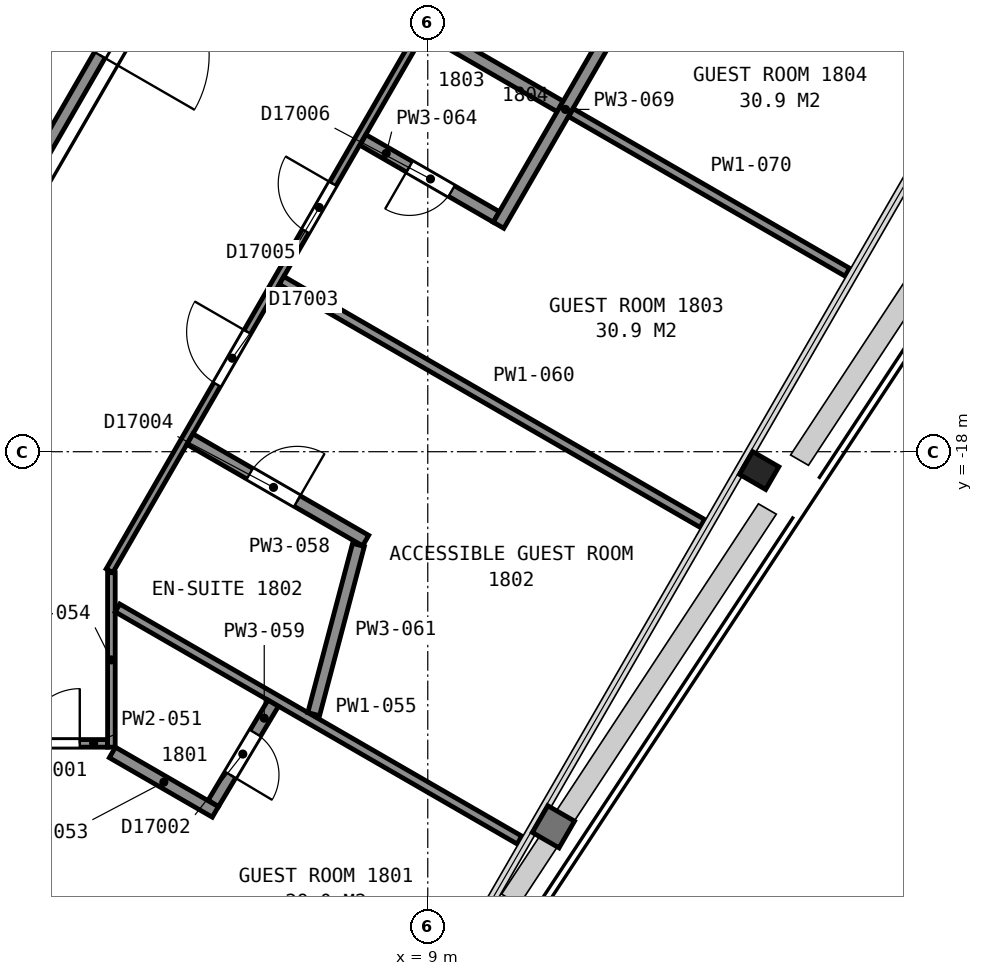
"""IFC4 building model, lengths in metres.
Left out: names, types, materials, properties, quantities, classifications, styles, units other than length and angle.
Written with IfcOpenShell. Run it as: python <this file> out.ifc"""

import sys

from ifc_helpers import new_model, si_unit, direction, frame, frame_2d, origin, origin_2d, place, context, subcontext, project, spatial, rectangle, i_section, extrude, element, fill, save


model = new_model("IFC4")
c1 = context("Model", 3, precision=1e-05, world=origin(), true_north=direction((0.0, 1.0)))
c2 = subcontext(c1, "Body", "Model", "MODEL_VIEW")
j1 = project(units=[si_unit("LENGTHUNIT", "METRE"), si_unit("PLANEANGLEUNIT", "RADIAN")], contexts=[c1])
p1 = place(None, origin())
s1 = spatial("IfcSite", under=j1, at=p1, CompositionType="ELEMENT")
p2 = place(p1, origin())
s2 = spatial("IfcBuilding", under=s1, at=p2, CompositionType="ELEMENT")
p3 = place(p2, frame((0.0, 0.0, 80.0)))
s3 = spatial("IfcBuildingStorey", under=s2, at=p3, CompositionType="ELEMENT", Elevation=80.0)
p4 = place(p3, frame((14.45, -18.31, 0.0), z_axis=(0.0, 0.0, 1.0), x_axis=(-0.5, -0.866025403784, 0.0)))
e1 = element("IfcColumn", 1, at=p4, inside=s3, PredefinedType="COLUMN", context=c2, shape_type="SweptSolid", body=[
    extrude(i_section(OverallWidth=0.432, OverallDepth=0.498, WebThickness=0.056, FlangeThickness=0.089, FilletRadius=0.015, at=origin_2d()), origin(), (0.0, 0.0, 1.0), 3.6),
])
p5 = place(p3, frame((1.677, -14.815, 0.0), z_axis=(0.0, 0.0, 1.0), x_axis=(0.49999445743, 0.866028603765, 0.0)))
e2 = element("IfcWall", 2, at=p5, inside=s3, PredefinedType="PARTITIONING", context=c2, shape_type="SweptSolid", body=[
    extrude(rectangle(XDim=5.905, YDim=0.2, at=frame_2d((2.952, 0.0))), origin(), (0.0, 0.0, 1.0), 3.35),
])
p6 = place(p5, frame((3.855, 0.0, 0.0)))
e3 = element("IfcOpeningElement", 3, at=p6, cuts=e2, PredefinedType="OPENING", context=c2, shape_type="SweptSolid", body=[
    extrude(rectangle(XDim=1.8, YDim=2.1, at=frame_2d((0.9, 1.05))), frame((0.0, 0.11, 0.0), z_axis=(0.0, -1.0, 0.0), x_axis=(1.0, 0.0, 0.0)), (0.0, 0.0, 1.0), 0.22),
])
p7 = place(p3, frame((1.203, -24.522, 0.0), z_axis=(0.0, 0.0, 1.0), x_axis=(0.866021771655, -0.500006290979, 0.0)))
e4 = element("IfcWall", 4, at=p7, inside=s3, PredefinedType="PARTITIONING", context=c2, shape_type="SweptSolid", body=[
    extrude(rectangle(XDim=7.992, YDim=0.15, at=frame_2d((3.996, 0.0))), origin(), (0.0, 0.0, 1.0), 2.613),
])
p8 = place(p3, frame((3.732, -22.797, 0.0), z_axis=(0.0, 0.0, 1.0), x_axis=(-1.0, 0.0, 0.0)))
e5 = element("IfcWall", 5, at=p8, inside=s3, PredefinedType="PARTITIONING", context=c2, shape_type="SweptSolid", body=[
    extrude(rectangle(XDim=1.52, YDim=0.125, at=frame_2d((0.76, 0.0))), origin(), (0.0, 0.0, 1.0), 2.613),
])
p9 = place(p8, frame((0.455, 0.0, 0.0)))
e6 = element("IfcOpeningElement", 6, at=p9, cuts=e5, PredefinedType="OPENING", context=c2, shape_type="SweptSolid", body=[
    extrude(rectangle(XDim=0.9, YDim=2.1, at=frame_2d((0.45, 1.05))), frame((0.0, 0.073, 0.0), z_axis=(0.0, -1.0, 0.0), x_axis=(1.0, 0.0, 0.0)), (0.0, 0.0, 1.0), 0.145),
])
p10 = place(p3, frame((3.813, -22.946, 0.0), z_axis=(0.0, 0.0, 1.0), x_axis=(0.865944380701, -0.500140309845, 0.0)))
e7 = element("IfcWall", 7, at=p10, inside=s3, PredefinedType="PARTITIONING", context=c2, shape_type="SweptSolid", body=[
    extrude(rectangle(XDim=1.956, YDim=0.2, at=frame_2d((0.978, 0.0))), origin(), (0.0, 0.0, 1.0), 2.613),
])
p11 = place(p3, frame((3.797, -22.86, 0.0), z_axis=(0.0, 0.0, 1.0), x_axis=(0.0, 1.0, 0.0)))
e8 = element("IfcWall", 8, at=p11, inside=s3, PredefinedType="PARTITIONING", context=c2, shape_type="SweptSolid", body=[
    extrude(rectangle(XDim=2.871, YDim=0.125, at=frame_2d((1.435, 0.0))), origin(), (0.0, 0.0, 1.0), 2.613),
])
p12 = place(p3, frame((3.897, -20.57, 0.0), z_axis=(0.0, 0.0, 1.0), x_axis=(0.866030628547, -0.499990950336, 0.0)))
e9 = element("IfcWall", 9, at=p12, inside=s3, PredefinedType="PARTITIONING", context=c2, shape_type="SweptSolid", body=[
    extrude(rectangle(XDim=7.635, YDim=0.15, at=frame_2d((3.817, 0.0))), origin(), (0.0, 0.0, 1.0), 2.613),
])
p13 = place(p3, frame((19.456, 7.217, 0.0), z_axis=(0.0, 0.0, 1.0), x_axis=(-0.50002170027, -0.866012874765, 0.0)))
e10 = element("IfcWall", 10, at=p13, inside=s3, PredefinedType="PARTITIONING", context=c2, shape_type="SweptSolid", body=[
    extrude(rectangle(XDim=31.379, YDim=0.125, at=frame_2d((15.69, 0.0))), origin(), (0.0, 0.0, 1.0), 2.613),
])
p14 = place(p13, frame((26.843, 0.0, 0.0)))
e11 = element("IfcOpeningElement", 11, at=p14, cuts=e10, PredefinedType="OPENING", context=c2, shape_type="SweptSolid", body=[
    extrude(rectangle(XDim=1.0, YDim=2.1, at=frame_2d((0.5, 1.05))), frame((0.0, 0.073, 0.0), z_axis=(0.0, -1.0, 0.0), x_axis=(1.0, 0.0, 0.0)), (0.0, 0.0, 1.0), 0.145),
])
p15 = place(p13, frame((24.03, 0.0, 0.0)))
e12 = element("IfcOpeningElement", 12, at=p15, cuts=e10, PredefinedType="OPENING", context=c2, shape_type="SweptSolid", body=[
    extrude(rectangle(XDim=0.9, YDim=2.1, at=frame_2d((0.45, 1.05))), frame((0.0, 0.073, 0.0), z_axis=(0.0, -1.0, 0.0), x_axis=(1.0, 0.0, 0.0)), (0.0, 0.0, 1.0), 0.145),
])
p16 = place(p13, frame((17.159, 0.0, 0.0)))
e13 = element("IfcOpeningElement", 13, at=p16, cuts=e10, PredefinedType="OPENING", context=c2, shape_type="SweptSolid", body=[
    extrude(rectangle(XDim=0.9, YDim=2.1, at=frame_2d((0.45, 1.05))), frame((0.0, 0.073, 0.0), z_axis=(0.0, -1.0, 0.0), x_axis=(1.0, 0.0, 0.0)), (0.0, 0.0, 1.0), 0.145),
])
p17 = place(p13, frame((14.24, 0.0, 0.0)))
e14 = element("IfcOpeningElement", 14, at=p17, cuts=e10, PredefinedType="OPENING", context=c2, shape_type="SweptSolid", body=[
    extrude(rectangle(XDim=0.9, YDim=2.1, at=frame_2d((0.45, 1.05))), frame((0.0, 0.073, 0.0), z_axis=(0.0, -1.0, 0.0), x_axis=(1.0, 0.0, 0.0)), (0.0, 0.0, 1.0), 0.145),
])
p18 = place(p13, frame((6.997, 0.0, 0.0)))
e15 = element("IfcOpeningElement", 15, at=p18, cuts=e10, PredefinedType="OPENING", context=c2, shape_type="SweptSolid", body=[
    extrude(rectangle(XDim=0.9, YDim=2.1, at=frame_2d((0.45, 1.05))), frame((0.0, 0.073, 0.0), z_axis=(0.0, -1.0, 0.0), x_axis=(1.0, 0.0, 0.0)), (0.0, 0.0, 1.0), 0.145),
])
p19 = place(p13, frame((4.327, 0.0, 0.0)))
e16 = element("IfcOpeningElement", 16, at=p19, cuts=e10, PredefinedType="OPENING", context=c2, shape_type="SweptSolid", body=[
    extrude(rectangle(XDim=0.9, YDim=2.1, at=frame_2d((0.45, 1.05))), frame((0.0, 0.073, 0.0), z_axis=(0.0, -1.0, 0.0), x_axis=(1.0, 0.0, 0.0)), (0.0, 0.0, 1.0), 0.145),
])
p20 = place(p3, frame((7.979, -19.462, 0.0), z_axis=(0.0, 0.0, 1.0), x_axis=(-0.866033317326, 0.499986293093, 0.0)))
e17 = element("IfcWall", 17, at=p20, inside=s3, PredefinedType="PARTITIONING", context=c2, shape_type="SweptSolid", body=[
    extrude(rectangle(XDim=3.337, YDim=0.2, at=frame_2d((1.669, 0.0))), origin(), (0.0, 0.0, 1.0), 2.613),
])
p21 = place(p20, frame((1.3, 0.0, 0.0)))
e18 = element("IfcOpeningElement", 18, at=p21, cuts=e17, PredefinedType="OPENING", context=c2, shape_type="SweptSolid", body=[
    extrude(rectangle(XDim=0.9, YDim=2.1, at=frame_2d((0.45, 1.05))), frame((0.0, 0.11, 0.0), z_axis=(0.0, -1.0, 0.0), x_axis=(1.0, 0.0, 0.0)), (0.0, 0.0, 1.0), 0.22),
])
p22 = place(p3, frame((5.474, -23.784, 0.0), z_axis=(0.0, 0.0, 1.0), x_axis=(0.512791921509, 0.858512926656, 0.0)))
e19 = element("IfcWall", 19, at=p22, inside=s3, PredefinedType="PARTITIONING", context=c2, shape_type="SweptSolid", body=[
    extrude(rectangle(XDim=1.919, YDim=0.2, at=frame_2d((0.959, 0.0))), origin(), (0.0, 0.0, 1.0), 2.613),
])
p23 = place(p22, frame((0.545, 0.0, 0.0)))
e20 = element("IfcOpeningElement", 20, at=p23, cuts=e19, PredefinedType="OPENING", context=c2, shape_type="SweptSolid", body=[
    extrude(rectangle(XDim=0.8, YDim=2.1, at=frame_2d((0.4, 1.05))), frame((0.0, 0.11, 0.0), z_axis=(0.0, -1.0, 0.0), x_axis=(1.0, 0.0, 0.0)), (0.0, 0.0, 1.0), 0.22),
])
p24 = place(p3, frame((6.595, -15.183, 0.0), z_axis=(0.0, 0.0, 1.0), x_axis=(0.866014133745, -0.500019519773, 0.0)))
e21 = element("IfcWall", 21, at=p24, inside=s3, PredefinedType="PARTITIONING", context=c2, shape_type="SweptSolid", body=[
    extrude(rectangle(XDim=7.991, YDim=0.15, at=frame_2d((3.996, 0.0))), origin(), (0.0, 0.0, 1.0), 2.613),
])
p25 = place(p3, frame((7.124, -22.317, 0.0), z_axis=(0.0, 0.0, 1.0), x_axis=(0.255720101769, 0.966750862193, 0.0)))
e22 = element("IfcWall", 22, at=p25, inside=s3, PredefinedType="PARTITIONING", context=c2, shape_type="SweptSolid", body=[
    extrude(rectangle(XDim=2.879, YDim=0.2, at=frame_2d((1.44, 0.0))), origin(), (0.0, 0.0, 1.0), 2.613),
])
p26 = place(p3, frame((7.935, -12.873, 0.0), z_axis=(0.0, 0.0, 1.0), x_axis=(0.866015388607, -0.500017346395, 0.0)))
e23 = element("IfcWall", 23, at=p26, inside=s3, PredefinedType="PARTITIONING", context=c2, shape_type="SweptSolid", body=[
    extrude(rectangle(XDim=2.532, YDim=0.2, at=frame_2d((1.266, 0.0))), origin(), (0.0, 0.0, 1.0), 2.613),
])
p27 = place(p26, frame((0.883, 0.0, 0.0)))
e24 = element("IfcOpeningElement", 24, at=p27, cuts=e23, PredefinedType="OPENING", context=c2, shape_type="SweptSolid", body=[
    extrude(rectangle(XDim=0.8, YDim=2.1, at=frame_2d((0.4, 1.05))), frame((0.0, 0.11, 0.0), z_axis=(0.0, -1.0, 0.0), x_axis=(1.0, 0.0, 0.0)), (0.0, 0.0, 1.0), 0.22),
])
p28 = place(p3, frame((8.98, -11.052, 0.0), z_axis=(0.0, 0.0, 1.0), x_axis=(0.865990087344, -0.500061164881, 0.0)))
e25 = element("IfcWall", 25, at=p28, inside=s3, PredefinedType="PARTITIONING", context=c2, shape_type="SweptSolid", body=[
    extrude(rectangle(XDim=2.537, YDim=0.2, at=frame_2d((1.269, 0.0))), origin(), (0.0, 0.0, 1.0), 2.613),
])
p29 = place(p3, frame((10.164, -14.276, 0.0), z_axis=(0.0, 0.0, 1.0), x_axis=(0.50017868667, 0.865922214405, 0.0)))
e26 = element("IfcWall", 26, at=p29, inside=s3, PredefinedType="PARTITIONING", context=c2, shape_type="SweptSolid", body=[
    extrude(rectangle(XDim=4.4, YDim=0.2, at=frame_2d((2.2, 0.0))), origin(), (0.0, 0.0, 1.0), 2.613),
])
p30 = place(p3, frame((11.355, -12.424, 0.0), z_axis=(0.0, 0.0, 1.0), x_axis=(0.866030680601, -0.499990860175, 0.0)))
e27 = element("IfcWall", 27, at=p30, inside=s3, PredefinedType="PARTITIONING", context=c2, shape_type="SweptSolid", body=[
    extrude(rectangle(XDim=5.249, YDim=0.15, at=frame_2d((2.625, 0.0))), origin(), (0.0, 0.0, 1.0), 2.613),
])
p31 = place(p6, origin())
e28 = element("IfcDoor", 28, at=p31, inside=s3, OperationType="DOUBLE_DOOR_SINGLE_SWING", PredefinedType="DOOR", context=c2, shape_type="SweptSolid", body=[
    extrude(rectangle(XDim=1.8, YDim=2.1, at=frame_2d((0.9, 1.05))), frame((0.0, 0.025, 0.0), z_axis=(0.0, -1.0, 0.0), x_axis=(1.0, 0.0, 0.0)), (0.0, 0.0, 1.0), 0.05),
])
fill(e3, e28)
p32 = place(p9, origin())
e29 = element("IfcDoor", 29, at=p32, inside=s3, OperationType="SINGLE_SWING_LEFT", PredefinedType="DOOR", context=c2, shape_type="SweptSolid", body=[
    extrude(rectangle(XDim=0.9, YDim=2.1, at=frame_2d((0.45, 1.05))), frame((0.0, 0.025, 0.0), z_axis=(0.0, -1.0, 0.0), x_axis=(1.0, 0.0, 0.0)), (0.0, 0.0, 1.0), 0.05),
])
fill(e6, e29)
p33 = place(p14, origin())
e30 = element("IfcDoor", 30, at=p33, inside=s3, OperationType="SINGLE_SWING_LEFT", PredefinedType="DOOR", context=c2, shape_type="SweptSolid", body=[
    extrude(rectangle(XDim=1.0, YDim=2.1, at=frame_2d((0.5, 1.05))), frame((0.0, 0.025, 0.0), z_axis=(0.0, -1.0, 0.0), x_axis=(1.0, 0.0, 0.0)), (0.0, 0.0, 1.0), 0.05),
])
fill(e11, e30)
p34 = place(p15, origin())
e31 = element("IfcDoor", 31, at=p34, inside=s3, OperationType="SINGLE_SWING_LEFT", PredefinedType="DOOR", context=c2, shape_type="SweptSolid", body=[
    extrude(rectangle(XDim=0.9, YDim=2.1, at=frame_2d((0.45, 1.05))), frame((0.0, 0.025, 0.0), z_axis=(0.0, -1.0, 0.0), x_axis=(1.0, 0.0, 0.0)), (0.0, 0.0, 1.0), 0.05),
])
fill(e12, e31)
p35 = place(p21, origin())
e32 = element("IfcDoor", 32, at=p35, inside=s3, OperationType="SINGLE_SWING_LEFT", PredefinedType="DOOR", context=c2, shape_type="SweptSolid", body=[
    extrude(rectangle(XDim=0.9, YDim=2.1, at=frame_2d((0.45, 1.05))), frame((0.0, 0.025, 0.0), z_axis=(0.0, -1.0, 0.0), x_axis=(1.0, 0.0, 0.0)), (0.0, 0.0, 1.0), 0.05),
])
fill(e18, e32)
p36 = place(p23, origin())
e33 = element("IfcDoor", 33, at=p36, inside=s3, OperationType="SINGLE_SWING_LEFT", PredefinedType="DOOR", context=c2, shape_type="SweptSolid", body=[
    extrude(rectangle(XDim=0.8, YDim=2.1, at=frame_2d((0.4, 1.05))), frame((0.0, 0.025, 0.0), z_axis=(0.0, -1.0, 0.0), x_axis=(1.0, 0.0, 0.0)), (0.0, 0.0, 1.0), 0.05),
])
fill(e20, e33)
p37 = place(p27, origin())
e34 = element("IfcDoor", 34, at=p37, inside=s3, OperationType="SINGLE_SWING_LEFT", PredefinedType="DOOR", context=c2, shape_type="SweptSolid", body=[
    extrude(rectangle(XDim=0.8, YDim=2.1, at=frame_2d((0.4, 1.05))), frame((0.0, 0.025, 0.0), z_axis=(0.0, -1.0, 0.0), x_axis=(1.0, 0.0, 0.0)), (0.0, 0.0, 1.0), 0.05),
])
fill(e24, e34)
save(model, sys.argv[1])
